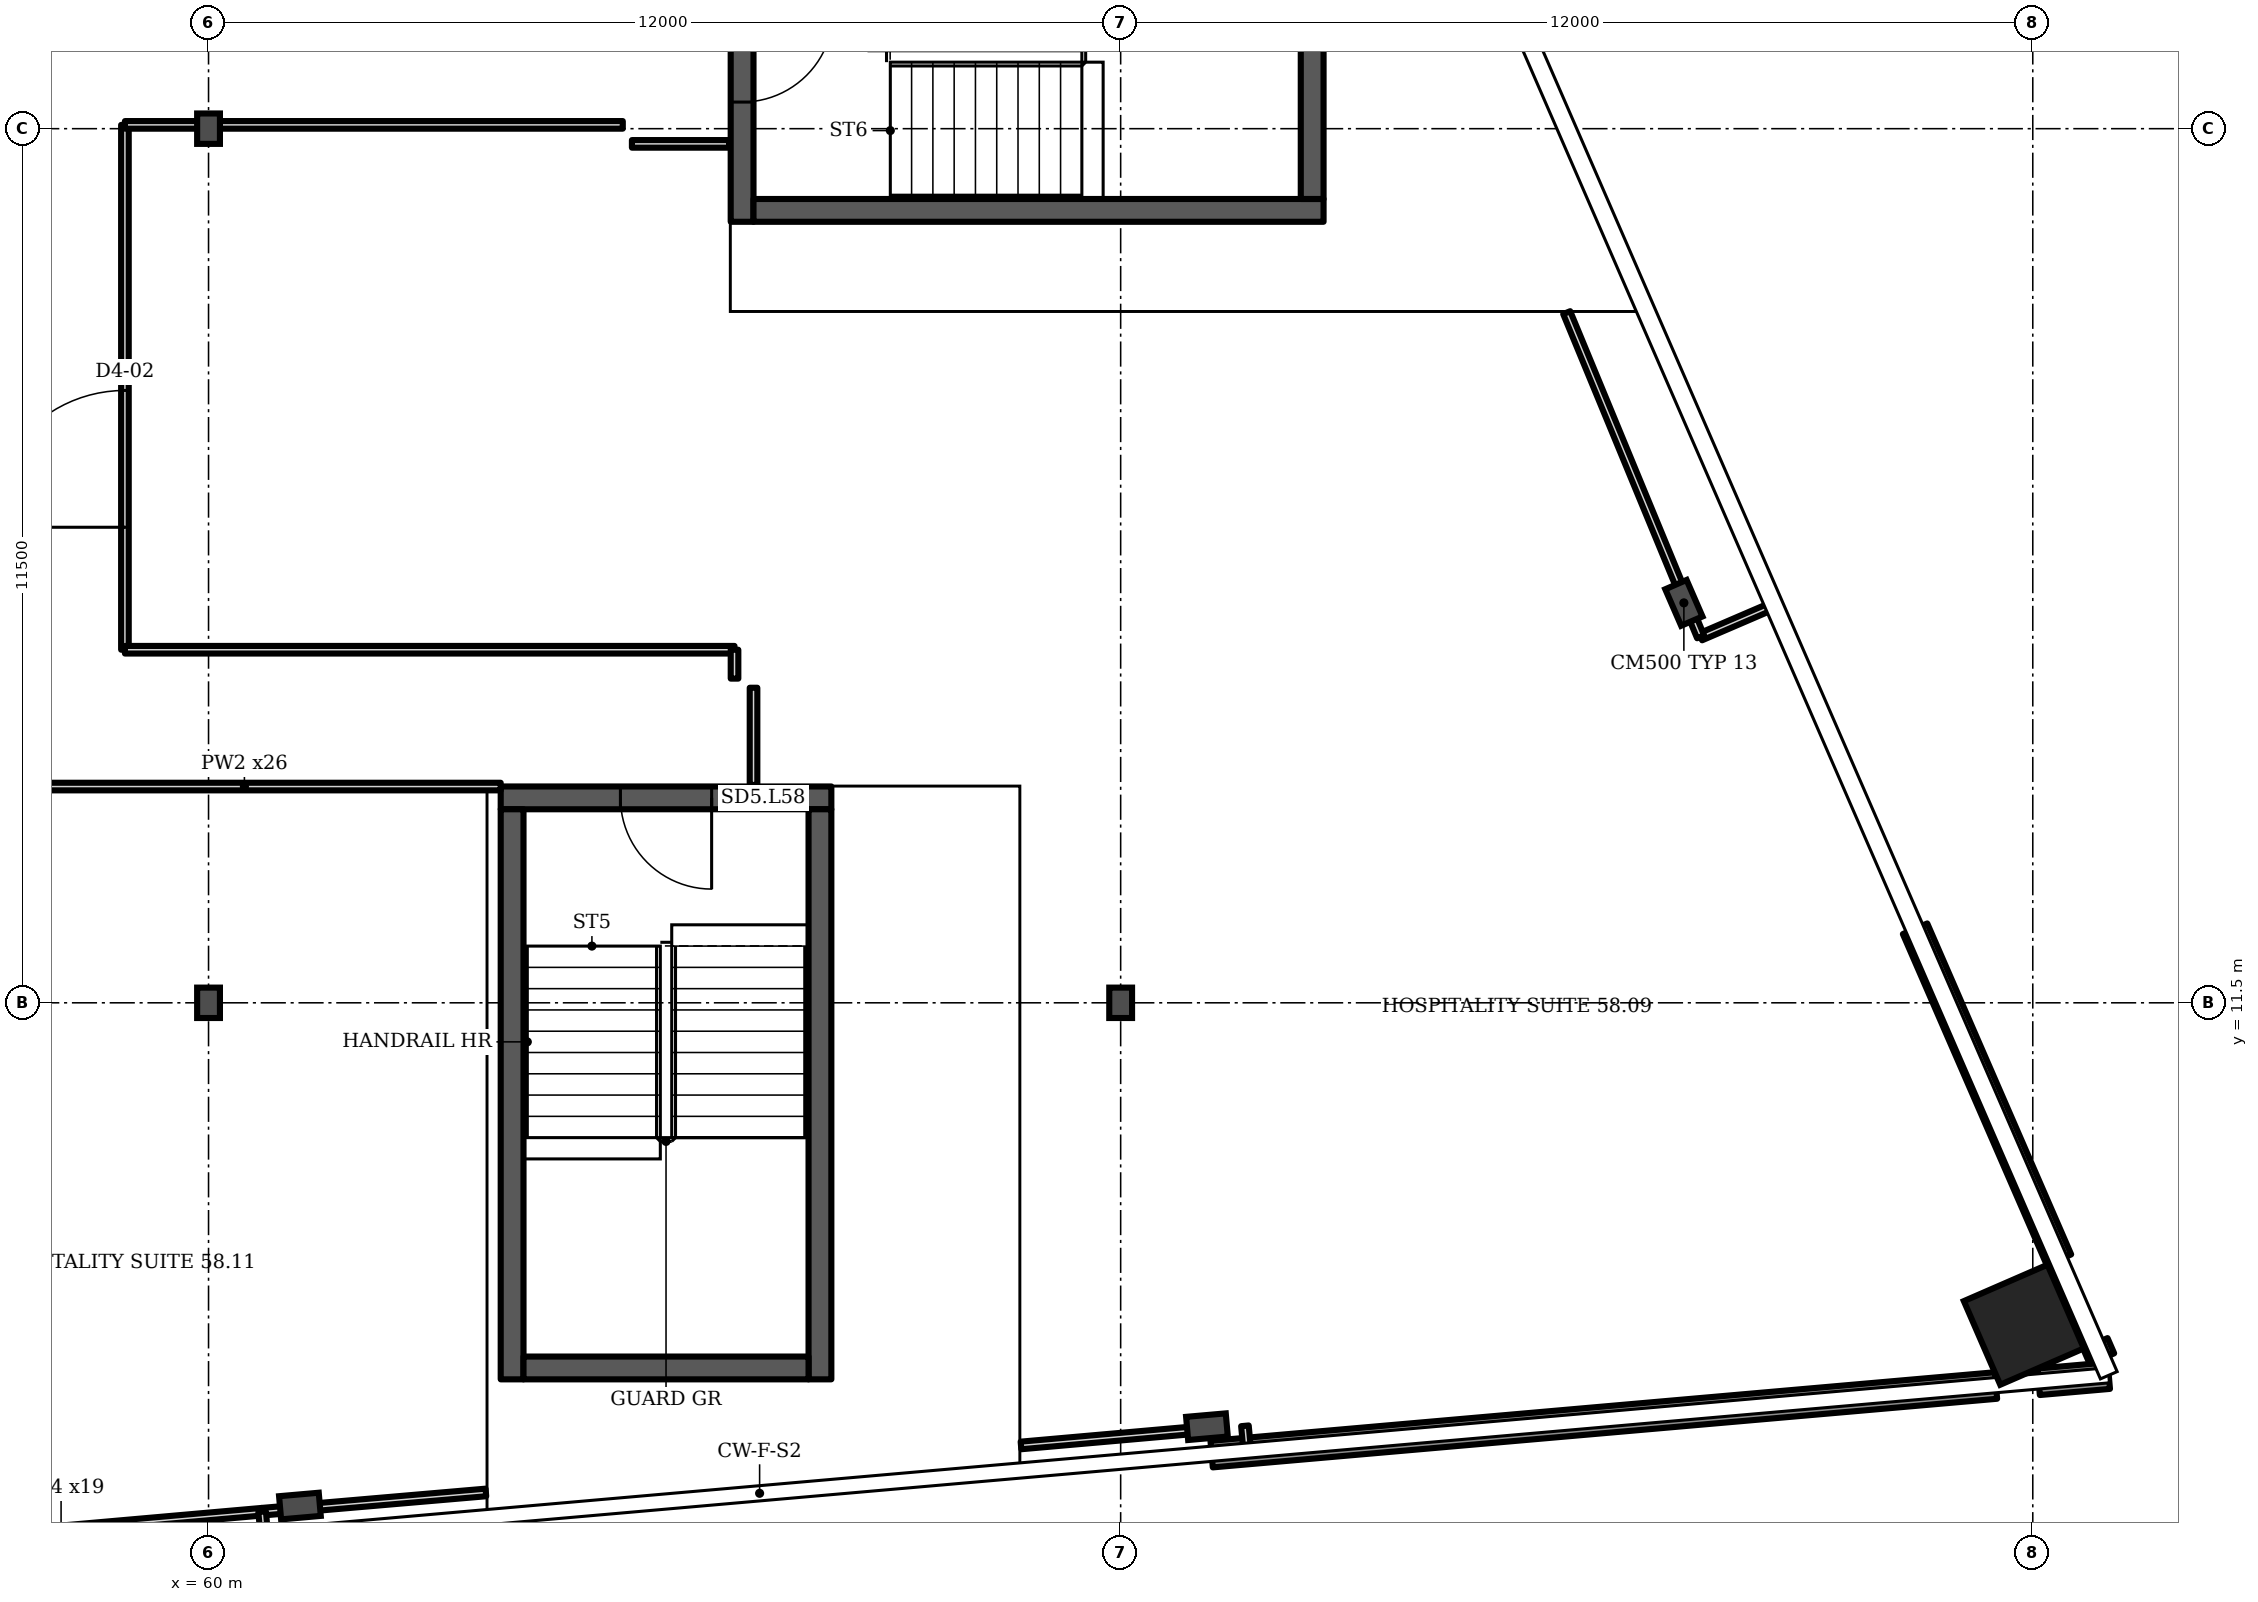
"""IFC4 building model, lengths in metres.
Left out: names, types, materials, properties, quantities, classifications, styles, units other than length and angle.
Written with IfcOpenShell. Run it as: python <this file> out.ifc"""

import sys

from ifc_helpers import new_model, si_unit, direction, frame, frame_2d, origin, origin_2d, place, context, subcontext, project, spatial, rectangle, i_section, extrude, element, fill, save


model = new_model("IFC4")
c1 = context("Model", 3, precision=1e-05, world=origin(), true_north=direction((0.0, 1.0)))
c2 = subcontext(c1, "Body", "Model", "MODEL_VIEW")
j1 = project(units=[si_unit("LENGTHUNIT", "METRE"), si_unit("PLANEANGLEUNIT", "RADIAN")], contexts=[c1])
p1 = place(None, origin())
s1 = spatial("IfcSite", under=j1, at=p1, CompositionType="ELEMENT")
p2 = place(p1, origin())
s2 = spatial("IfcBuilding", under=s1, at=p2, CompositionType="ELEMENT")
p3 = place(p2, frame((0.0, 0.0, 232.3)))
s3 = spatial("IfcBuildingStorey", under=s2, at=p3, CompositionType="ELEMENT", Elevation=232.3)
p4 = place(p3, frame((83.883, 7.265, 0.0), z_axis=(0.0, 0.0, 1.0), x_axis=(-0.398727, 0.917072, 0.0)))
e1 = element("IfcColumn", 1, at=p4, inside=s3, PredefinedType="COLUMN", context=c2, shape_type="SweptSolid", body=[
    extrude(rectangle(XDim=1.2, YDim=1.2, at=origin_2d()), origin(), (0.0, 0.0, 1.0), 3.6),
])
for number, where, z_axis, x_axis in (
    (2, (61.202, 4.879, 0.0), (0.0, 0.0, 1.0), (0.087, -0.996, 0.0)),
    (3, (73.135, 5.923, 0.0), (0.0, 0.0, 1.0), (0.087, -0.996, 0.0)),
    (4, (79.41, 16.762, 0.0), (0.0, 0.0, 1.0), (0.917, 0.399, 0.0)),
):
    element("IfcColumn", number, at=place(p3, frame(where, z_axis=z_axis, x_axis=x_axis)), inside=s3, PredefinedType="COLUMN", context=c2, shape_type="SweptSolid", body=[
        extrude(i_section(OverallWidth=0.306, OverallDepth=0.524, WebThickness=0.021, FlangeThickness=0.04, FilletRadius=0.027, at=origin_2d()), origin(), (0.0, 0.0, 1.0), 3.6),
    ])
for number, where, z_axis, x_axis in (
    (5, (60.0, 11.5, 0.0), (0.0, 0.0, 1.0), (1.0, 0.0, 0.0)),
    (6, (72.0, 11.5, 0.0), (0.0, 0.0, 1.0), (1.0, 0.0, 0.0)),
    (7, (60.0, 23.0, 0.0), (0.0, 0.0, 1.0), (1.0, 0.0, 0.0)),
):
    element("IfcColumn", number, at=place(p3, frame(where, z_axis=z_axis, x_axis=x_axis)), inside=s3, PredefinedType="COLUMN", context=c2, shape_type="SweptSolid", body=[
        extrude(i_section(OverallWidth=0.3, OverallDepth=0.4, WebThickness=0.013, FlangeThickness=0.024, FilletRadius=0.027, at=origin_2d()), origin(), (0.0, 0.0, 1.0), 3.6),
    ])
p5 = place(p3, frame((73.197, 5.562, 0.0), z_axis=(0.0, 0.0, 1.0), x_axis=(0.996198, 0.087163, 0.0)))
e8 = element("IfcWall", 8, at=p5, inside=s3, PredefinedType="SOLIDWALL", context=c2, shape_type="SweptSolid", body=[
    extrude(rectangle(XDim=10.358, YDim=0.35, at=frame_2d((5.179, 0.0))), origin(), (0.0, 0.0, 1.0), 1.0),
])
p6 = place(p3, frame((84.078, 6.514, 0.0), z_axis=(0.0, 0.0, 1.0), x_axis=(0.996213, 0.086971, 0.0)))
e9 = element("IfcWall", 9, at=p6, inside=s3, PredefinedType="SOLIDWALL", context=c2, shape_type="SweptSolid", body=[
    extrude(rectangle(XDim=0.926, YDim=0.35, at=frame_2d((0.463, 0.0))), origin(), (0.0, 0.0, 1.0), 1.0),
])
p7 = place(p3, frame((84.91, 6.819, 0.0), z_axis=(0.0, 0.0, 1.0), x_axis=(-0.398359, 0.91723, 0.0)))
e10 = element("IfcWall", 10, at=p7, inside=s3, PredefinedType="SOLIDWALL", context=c2, shape_type="SweptSolid", body=[
    extrude(rectangle(XDim=0.219, YDim=0.35, at=frame_2d((0.109, 0.0))), origin(), (0.0, 0.0, 1.0), 1.0),
])
p8 = place(p3, frame((84.345, 8.12, 0.0), z_axis=(0.0, 0.0, 1.0), x_axis=(-0.398736, 0.917067, 0.0)))
e11 = element("IfcWall", 11, at=p8, inside=s3, PredefinedType="SOLIDWALL", context=c2, shape_type="SweptSolid", body=[
    extrude(rectangle(XDim=4.748, YDim=0.35, at=frame_2d((2.374, 0.0))), origin(), (0.0, 0.0, 1.0), 1.0),
])
p9 = place(p3, frame((63.844, 14.196, 0.0), z_axis=(0.0, 0.0, 1.0), x_axis=(1.0, 0.0, 0.0)))
e12 = element("IfcWall", 12, at=p9, inside=s3, PredefinedType="SHEAR", context=c2, shape_type="SweptSolid", body=[
    extrude(rectangle(XDim=4.35, YDim=0.3, at=frame_2d((2.175, 0.0))), origin(), (0.0, 0.0, 1.0), 3.2),
])
p10 = place(p9, frame((1.575, 0.0, 0.0)))
e13 = element("IfcOpeningElement", 13, at=p10, cuts=e12, PredefinedType="OPENING", context=c2, shape_type="SweptSolid", body=[
    extrude(rectangle(XDim=1.2, YDim=2.1, at=frame_2d((0.6, 1.05))), frame((0.0, 0.16, 0.0), z_axis=(0.0, -1.0, 0.0), x_axis=(1.0, 0.0, 0.0)), (0.0, 0.0, 1.0), 0.32),
])
p11 = place(p3, frame((67.02, 21.775, 0.0), z_axis=(0.0, 0.0, 1.0), x_axis=(0.0, 1.0, 0.0)))
e14 = element("IfcWall", 14, at=p11, inside=s3, PredefinedType="SHEAR", context=c2, shape_type="SweptSolid", body=[
    extrude(rectangle(XDim=4.35, YDim=0.3, at=frame_2d((2.175, 0.0))), origin(), (0.0, 0.0, 1.0), 3.2),
])
p12 = place(p11, frame((1.575, 0.0, 0.0)))
e15 = element("IfcOpeningElement", 15, at=p12, cuts=e14, PredefinedType="OPENING", context=c2, shape_type="SweptSolid", body=[
    extrude(rectangle(XDim=1.2, YDim=2.1, at=frame_2d((0.6, 1.05))), frame((0.0, 0.16, 0.0), z_axis=(0.0, -1.0, 0.0), x_axis=(1.0, 0.0, 0.0)), (0.0, 0.0, 1.0), 0.32),
])
p13 = place(p3, frame((55.415, 4.34, 0.0), z_axis=(0.0, 0.0, 1.0), x_axis=(0.996159, 0.087534, 0.0)))
e16 = element("IfcWall", 16, at=p13, inside=s3, PredefinedType="PARTITIONING", context=c2, shape_type="SweptSolid", body=[
    extrude(rectangle(XDim=5.31, YDim=0.1, at=frame_2d((2.655, 0.0))), origin(), (0.0, 0.0, 1.0), 2.58),
])
p14 = place(p3, frame((57.1, 14.345, 0.0), z_axis=(0.0, 0.0, 1.0), x_axis=(1.0, 0.0, 0.0)))
e17 = element("IfcWall", 17, at=p14, inside=s3, PredefinedType="PARTITIONING", context=c2, shape_type="SweptSolid", body=[
    extrude(rectangle(XDim=6.744, YDim=0.1, at=frame_2d((3.372, 0.0))), origin(), (0.0, 0.0, 1.0), 3.2),
])
p15 = place(p3, frame((58.9, 16.145, 0.0), z_axis=(0.0, 0.0, 1.0), x_axis=(0.0, 1.0, 0.0)))
e18 = element("IfcWall", 18, at=p15, inside=s3, PredefinedType="PARTITIONING", context=c2, shape_type="SweptSolid", body=[
    extrude(rectangle(XDim=6.905, YDim=0.1, at=frame_2d((3.453, 0.0))), origin(), (0.0, 0.0, 1.0), 3.2),
])
p16 = place(p15, frame((1.611, 0.0, 0.0)))
e19 = element("IfcOpeningElement", 19, at=p16, cuts=e18, PredefinedType="OPENING", context=c2, shape_type="SweptSolid", body=[
    extrude(rectangle(XDim=1.8, YDim=2.1, at=frame_2d((0.9, 1.05))), frame((0.0, 0.06, 0.0), z_axis=(0.0, -1.0, 0.0), x_axis=(1.0, 0.0, 0.0)), (0.0, 0.0, 1.0), 0.12),
])
p17 = place(p3, frame((58.9, 16.145, 0.0), z_axis=(0.0, 0.0, 1.0), x_axis=(1.0, 0.0, 0.0)))
e20 = element("IfcWall", 20, at=p17, inside=s3, PredefinedType="PARTITIONING", context=c2, shape_type="SweptSolid", body=[
    extrude(rectangle(XDim=8.02, YDim=0.1, at=frame_2d((4.01, 0.0))), origin(), (0.0, 0.0, 1.0), 3.2),
])
p18 = place(p3, frame((58.9, 23.05, 0.0), z_axis=(0.0, 0.0, 1.0), x_axis=(1.0, 0.0, 0.0)))
e21 = element("IfcWall", 21, at=p18, inside=s3, PredefinedType="PARTITIONING", context=c2, shape_type="SweptSolid", body=[
    extrude(rectangle(XDim=6.55, YDim=0.1, at=frame_2d((3.275, 0.0))), origin(), (0.0, 0.0, 1.0), 3.2),
])
p19 = place(p3, frame((60.705, 4.805, 0.0), z_axis=(0.0, 0.0, 1.0), x_axis=(0.996324, 0.085692, 0.0)))
e22 = element("IfcWall", 22, at=p19, inside=s3, PredefinedType="PARTITIONING", context=c2, shape_type="SweptSolid", body=[
    extrude(rectangle(XDim=2.955, YDim=0.1, at=frame_2d((1.477, 0.0))), origin(), (0.0, 0.0, 1.0), 2.58),
])
p20 = place(p3, frame((60.733, 4.497, 0.0), z_axis=(0.0, 0.0, 1.0), x_axis=(-0.090037, 0.995936, 0.0)))
e23 = element("IfcWall", 23, at=p20, inside=s3, PredefinedType="PARTITIONING", context=c2, shape_type="SweptSolid", body=[
    extrude(rectangle(XDim=0.309, YDim=0.1, at=frame_2d((0.155, 0.0))), origin(), (0.0, 0.0, 1.0), 3.2),
])
p21 = place(p3, frame((65.57, 22.8, 0.0), z_axis=(0.0, 0.0, 1.0), x_axis=(1.0, 0.0, 0.0)))
e24 = element("IfcWall", 24, at=p21, inside=s3, PredefinedType="PARTITIONING", context=c2, shape_type="SweptSolid", body=[
    extrude(rectangle(XDim=1.28, YDim=0.1, at=frame_2d((0.64, 0.0))), origin(), (0.0, 0.0, 1.0), 3.2),
])
p22 = place(p3, frame((66.92, 15.765, 0.0), z_axis=(0.0, 0.0, 1.0), x_axis=(0.0, 1.0, 0.0)))
e25 = element("IfcWall", 25, at=p22, inside=s3, PredefinedType="PARTITIONING", context=c2, shape_type="SweptSolid", body=[
    extrude(rectangle(XDim=0.38, YDim=0.1, at=frame_2d((0.19, 0.0))), origin(), (0.0, 0.0, 1.0), 3.2),
])
p23 = place(p3, frame((67.17, 14.366, 0.0), z_axis=(0.0, 0.0, 1.0), x_axis=(0.0, 1.0, 0.0)))
e26 = element("IfcWall", 26, at=p23, inside=s3, PredefinedType="PARTITIONING", context=c2, shape_type="SweptSolid", body=[
    extrude(rectangle(XDim=1.279, YDim=0.1, at=frame_2d((0.639, 0.0))), origin(), (0.0, 0.0, 1.0), 3.2),
])
p24 = place(p3, frame((70.689, 5.677, 0.0), z_axis=(0.0, 0.0, 1.0), x_axis=(0.996136, 0.087799, 0.0)))
e27 = element("IfcWall", 27, at=p24, inside=s3, PredefinedType="PARTITIONING", context=c2, shape_type="SweptSolid", body=[
    extrude(rectangle(XDim=2.486, YDim=0.1, at=frame_2d((1.243, 0.0))), origin(), (0.0, 0.0, 1.0), 2.58),
])
p25 = place(p3, frame((73.663, 5.628, 0.0), z_axis=(0.0, 0.0, 1.0), x_axis=(-0.091893, 0.995772, 0.0)))
e28 = element("IfcWall", 28, at=p25, inside=s3, PredefinedType="PARTITIONING", context=c2, shape_type="SweptSolid", body=[
    extrude(rectangle(XDim=0.308, YDim=0.1, at=frame_2d((0.154, 0.0))), origin(), (0.0, 0.0, 1.0), 3.2),
])
p26 = place(p3, frame((79.63, 16.315, 0.0), z_axis=(0.0, 0.0, 1.0), x_axis=(0.918616, 0.395147, 0.0)))
e29 = element("IfcWall", 29, at=p26, inside=s3, PredefinedType="PARTITIONING", context=c2, shape_type="SweptSolid", body=[
    extrude(rectangle(XDim=1.031, YDim=0.1, at=frame_2d((0.516, 0.0))), origin(), (0.0, 0.0, 1.0), 2.58),
])
p27 = place(p3, frame((79.63, 16.315, 0.0), z_axis=(0.0, 0.0, 1.0), x_axis=(-0.381721, 0.924278, 0.0)))
e30 = element("IfcWall", 30, at=p27, inside=s3, PredefinedType="PARTITIONING", context=c2, shape_type="SweptSolid", body=[
    extrude(rectangle(XDim=4.615, YDim=0.1, at=frame_2d((2.307, 0.0))), origin(), (0.0, 0.0, 1.0), 3.2),
])
for number, where, z_axis, x_axis in (
    (31, (63.994, 6.546, 0.0), (0.0, 0.0, 1.0), (0.0, 1.0, 0.0)),
    (32, (68.044, 6.546, 0.0), (0.0, 0.0, 1.0), (0.0, 1.0, 0.0)),
):
    element("IfcWall", number, at=place(p3, frame(where, z_axis=z_axis, x_axis=x_axis)), inside=s3, PredefinedType="SHEAR", context=c2, shape_type="SweptSolid", body=[
        extrude(rectangle(XDim=7.5, YDim=0.3, at=frame_2d((3.75, 0.0))), origin(), (0.0, 0.0, 1.0), 3.2),
    ])
p28 = place(p3, frame((64.144, 6.696, 0.0), z_axis=(0.0, 0.0, 1.0), x_axis=(1.0, 0.0, 0.0)))
e33 = element("IfcWall", 33, at=p28, inside=s3, PredefinedType="SHEAR", context=c2, shape_type="SweptSolid", body=[
    extrude(rectangle(XDim=3.75, YDim=0.3, at=frame_2d((1.875, 0.0))), origin(), (0.0, 0.0, 1.0), 3.2),
])
p29 = place(p3, frame((67.17, 21.925, 0.0), z_axis=(0.0, 0.0, 1.0), x_axis=(1.0, 0.0, 0.0)))
e34 = element("IfcWall", 34, at=p29, inside=s3, PredefinedType="SHEAR", context=c2, shape_type="SweptSolid", body=[
    extrude(rectangle(XDim=7.5, YDim=0.3, at=frame_2d((3.75, 0.0))), origin(), (0.0, 0.0, 1.0), 3.2),
])
p30 = place(p3, frame((74.52, 22.075, 0.0), z_axis=(0.0, 0.0, 1.0), x_axis=(0.0, 1.0, 0.0)))
e35 = element("IfcWall", 35, at=p30, inside=s3, PredefinedType="SHEAR", context=c2, shape_type="SweptSolid", body=[
    extrude(rectangle(XDim=3.75, YDim=0.3, at=frame_2d((1.875, 0.0))), origin(), (0.0, 0.0, 1.0), 3.2),
])
p31 = place(p10, origin())
e36 = element("IfcDoor", 36, at=p31, inside=s3, OperationType="SINGLE_SWING_RIGHT", PredefinedType="DOOR", context=c2, shape_type="SweptSolid", body=[
    extrude(rectangle(XDim=1.2, YDim=2.1, at=frame_2d((0.6, 1.05))), frame((0.0, 0.025, 0.0), z_axis=(0.0, -1.0, 0.0), x_axis=(1.0, 0.0, 0.0)), (0.0, 0.0, 1.0), 0.05),
])
fill(e13, e36)
p32 = place(p12, origin())
e37 = element("IfcDoor", 37, at=p32, inside=s3, OperationType="SINGLE_SWING_RIGHT", PredefinedType="DOOR", context=c2, shape_type="SweptSolid", body=[
    extrude(rectangle(XDim=1.2, YDim=2.1, at=frame_2d((0.6, 1.05))), frame((0.0, 0.025, 0.0), z_axis=(0.0, -1.0, 0.0), x_axis=(1.0, 0.0, 0.0)), (0.0, 0.0, 1.0), 0.05),
])
fill(e15, e37)
p33 = place(p16, origin())
e38 = element("IfcDoor", 38, at=p33, inside=s3, OperationType="DOUBLE_DOOR_SINGLE_SWING", PredefinedType="DOOR", context=c2, shape_type="SweptSolid", body=[
    extrude(rectangle(XDim=1.8, YDim=2.1, at=frame_2d((0.9, 1.05))), frame((0.0, 0.025, 0.0), z_axis=(0.0, -1.0, 0.0), x_axis=(1.0, 0.0, 0.0)), (0.0, 0.0, 1.0), 0.05),
])
fill(e19, e38)
save(model, sys.argv[1])
